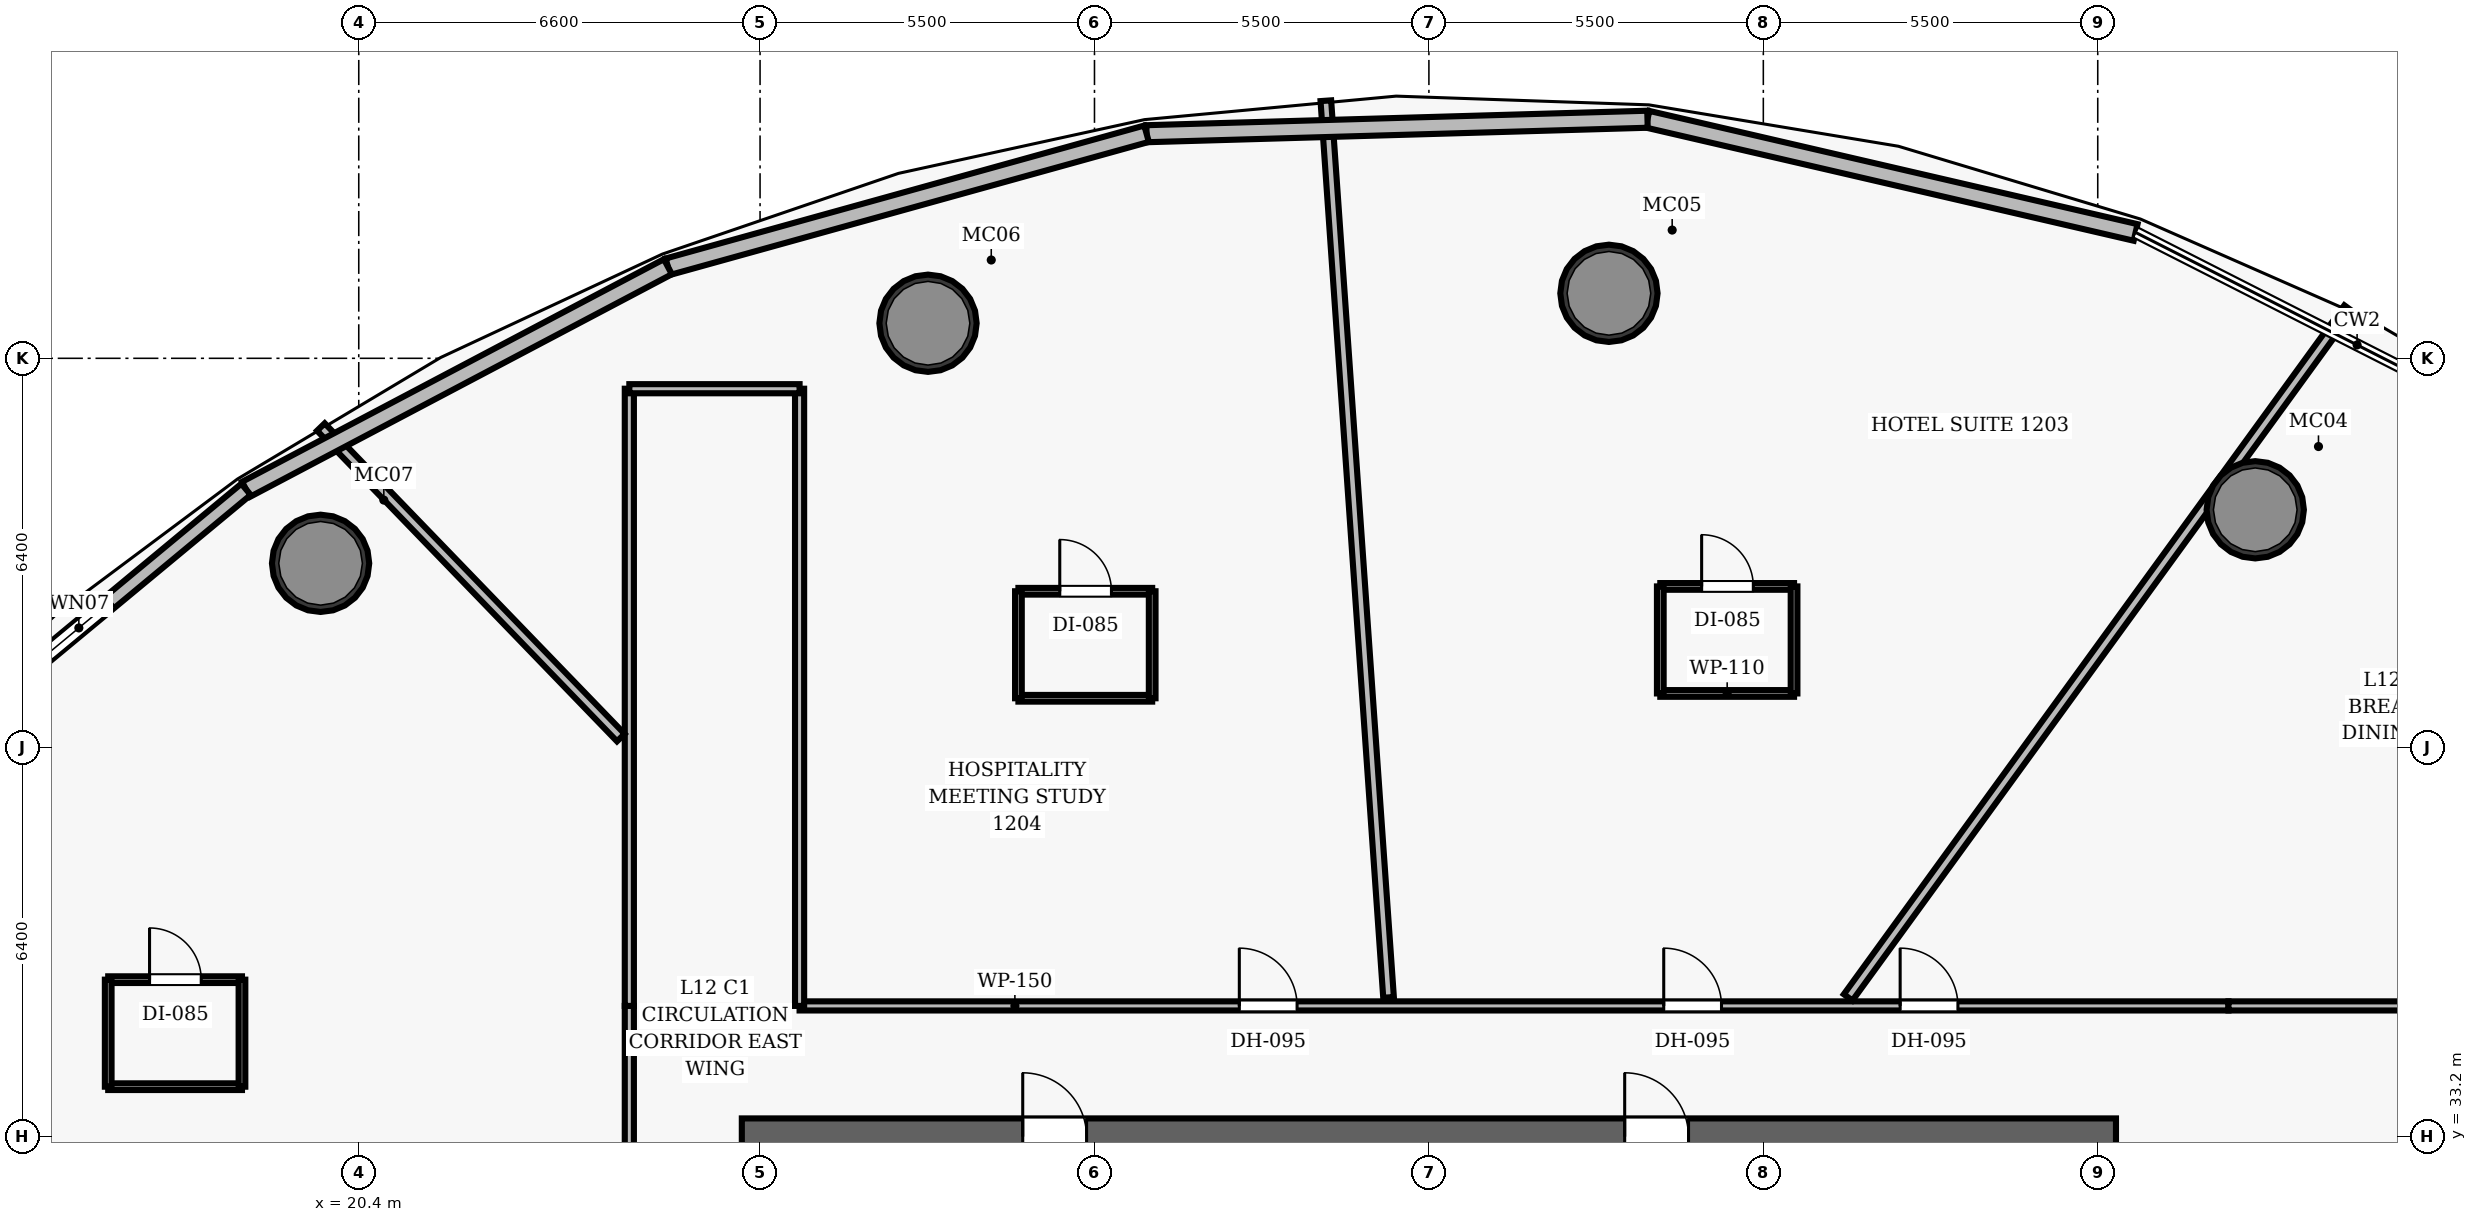
"""IFC4 building model, lengths in metres.
Left out: names, types, materials, properties, quantities, classifications, styles, units other than length and angle.
Written with IfcOpenShell. Run it as: python <this file> out.ifc"""

import sys

from ifc_helpers import new_model, si_unit, direction, frame, frame_2d, origin, origin_2d, place, context, subcontext, project, spatial, rectangle, hollow_circle, extrude, element, fill, save


model = new_model("IFC4")
c1 = context("Model", 3, precision=1e-05, world=origin(), true_north=direction((0.0, 1.0)))
c2 = subcontext(c1, "Body", "Model", "MODEL_VIEW")
j1 = project(units=[si_unit("LENGTHUNIT", "METRE"), si_unit("PLANEANGLEUNIT", "RADIAN")], contexts=[c1])
p1 = place(None, origin())
s1 = spatial("IfcSite", under=j1, at=p1, CompositionType="ELEMENT")
p2 = place(p1, origin())
s2 = spatial("IfcBuilding", under=s1, at=p2, CompositionType="ELEMENT")
p3 = place(p2, frame((0.0, 0.0, 58.9)))
s3 = spatial("IfcBuildingStorey", under=s2, at=p3, CompositionType="ELEMENT", Elevation=58.9)
p4 = place(p3, frame((26.7, 33.2, 0.0), z_axis=(0.0, 0.0, 1.0), x_axis=(1.0, 0.0, 0.0)))
e1 = element("IfcWall", 1, at=p4, inside=s3, PredefinedType="SHEAR", context=c2, shape_type="SweptSolid", body=[
    extrude(rectangle(XDim=22.6, YDim=0.6, at=frame_2d((11.3, 0.0))), origin(), (0.0, 0.0, 1.0), 3.5),
])
p5 = place(p4, frame((4.62, 0.0, 0.0)))
e2 = element("IfcOpeningElement", 2, at=p5, cuts=e1, PredefinedType="OPENING", context=c2, shape_type="SweptSolid", body=[
    extrude(rectangle(XDim=1.05, YDim=2.15, at=frame_2d((0.525, 1.075))), frame((0.0, 0.31, 0.0), z_axis=(0.0, -1.0, 0.0), x_axis=(1.0, 0.0, 0.0)), (0.0, 0.0, 1.0), 0.62),
])
p6 = place(p4, frame((14.52, 0.0, 0.0)))
e3 = element("IfcOpeningElement", 3, at=p6, cuts=e1, PredefinedType="OPENING", context=c2, shape_type="SweptSolid", body=[
    extrude(rectangle(XDim=1.05, YDim=2.15, at=frame_2d((0.525, 1.075))), frame((0.0, 0.31, 0.0), z_axis=(0.0, -1.0, 0.0), x_axis=(1.0, 0.0, 0.0)), (0.0, 0.0, 1.0), 0.62),
])
for number, where, z_axis, x_axis in (
    (4, (51.59, 43.509, 0.0), (0.0, 0.0, 1.0), (1.0, 0.0, 0.0)),
    (5, (40.961, 47.069, 0.0), (0.0, 0.0, 1.0), (1.0, 0.0, 0.0)),
    (6, (29.762, 46.577, 0.0), (0.0, 0.0, 1.0), (1.0, 0.0, 0.0)),
    (7, (19.772, 42.629, 0.0), (0.0, 0.0, 1.0), (1.0, 0.0, 0.0)),
):
    element("IfcColumn", number, at=place(p3, frame(where, z_axis=z_axis, x_axis=x_axis)), inside=s3, PredefinedType="COLUMN", context=c2, shape_type="SweptSolid", body=[
        extrude(hollow_circle(Radius=0.8, WallThickness=0.06, at=origin_2d()), origin(), (0.0, 0.0, 1.0), 3.5),
    ])
p7 = place(p3, frame((27.65, 35.35, 0.0), z_axis=(0.0, 0.0, 1.0), x_axis=(1.0, 0.0, 0.0)))
e8 = element("IfcWall", 8, at=p7, inside=s3, PredefinedType="PARTITIONING", context=c2, shape_type="SweptSolid", body=[
    extrude(rectangle(XDim=23.5, YDim=0.15, at=frame_2d((11.75, 0.0))), origin(), (0.0, 0.0, 1.0), 2.6),
])
p8 = place(p7, frame((18.1, 0.0, 0.0)))
e9 = element("IfcOpeningElement", 9, at=p8, cuts=e8, PredefinedType="OPENING", context=c2, shape_type="SweptSolid", body=[
    extrude(rectangle(XDim=0.95, YDim=2.15, at=frame_2d((0.475, 1.075))), frame((0.0, 0.085, 0.0), z_axis=(0.0, -1.0, 0.0), x_axis=(1.0, 0.0, 0.0)), (0.0, 0.0, 1.0), 0.17),
])
p9 = place(p7, frame((14.212, 0.0, 0.0)))
e10 = element("IfcOpeningElement", 10, at=p9, cuts=e8, PredefinedType="OPENING", context=c2, shape_type="SweptSolid", body=[
    extrude(rectangle(XDim=0.95, YDim=2.15, at=frame_2d((0.475, 1.075))), frame((0.0, 0.085, 0.0), z_axis=(0.0, -1.0, 0.0), x_axis=(1.0, 0.0, 0.0)), (0.0, 0.0, 1.0), 0.17),
])
p10 = place(p7, frame((7.232, 0.0, 0.0)))
e11 = element("IfcOpeningElement", 11, at=p10, cuts=e8, PredefinedType="OPENING", context=c2, shape_type="SweptSolid", body=[
    extrude(rectangle(XDim=0.95, YDim=2.15, at=frame_2d((0.475, 1.075))), frame((0.0, 0.085, 0.0), z_axis=(0.0, -1.0, 0.0), x_axis=(1.0, 0.0, 0.0)), (0.0, 0.0, 1.0), 0.17),
])
p11 = place(p3, frame((24.85, 19.45, 0.0), z_axis=(0.0, 0.0, 1.0), x_axis=(0.0, 1.0, 0.0)))
e12 = element("IfcWall", 12, at=p11, inside=s3, PredefinedType="PARTITIONING", context=c2, shape_type="SweptSolid", body=[
    extrude(rectangle(XDim=15.9, YDim=0.15, at=frame_2d((7.95, 0.0))), origin(), (0.0, 0.0, 1.0), 2.6),
])
p12 = place(p11, frame((9.236, 0.0, 0.0)))
e13 = element("IfcOpeningElement", 13, at=p12, cuts=e12, PredefinedType="OPENING", context=c2, shape_type="SweptSolid", body=[
    extrude(rectangle(XDim=0.95, YDim=2.15, at=frame_2d((0.475, 1.075))), frame((0.0, 0.085, 0.0), z_axis=(0.0, -1.0, 0.0), x_axis=(1.0, 0.0, 0.0)), (0.0, 0.0, 1.0), 0.17),
])
p13 = place(p11, frame((5.706, 0.0, 0.0)))
e14 = element("IfcOpeningElement", 14, at=p13, cuts=e12, PredefinedType="OPENING", context=c2, shape_type="SweptSolid", body=[
    extrude(rectangle(XDim=0.95, YDim=2.15, at=frame_2d((0.475, 1.075))), frame((0.0, 0.085, 0.0), z_axis=(0.0, -1.0, 0.0), x_axis=(1.0, 0.0, 0.0)), (0.0, 0.0, 1.0), 0.17),
])
p14 = place(p3, frame((51.15, 35.35, 0.0), z_axis=(0.0, 0.0, 1.0), x_axis=(1.0, 0.0, 0.0)))
e15 = element("IfcWall", 15, at=p14, inside=s3, PredefinedType="PARTITIONING", context=c2, shape_type="SweptSolid", body=[
    extrude(rectangle(XDim=14.35, YDim=0.15, at=frame_2d((7.175, 0.0))), origin(), (0.0, 0.0, 1.0), 2.6),
])
for number, where, z_axis, x_axis in (
    (16, (24.85, 35.35, 0.0), (0.0, 0.0, 1.0), (0.0, 1.0, 0.0)),
    (17, (27.65, 35.35, 0.0), (0.0, 0.0, 1.0), (0.0, 1.0, 0.0)),
):
    element("IfcWall", number, at=place(p3, frame(where, z_axis=z_axis, x_axis=x_axis)), inside=s3, PredefinedType="PARTITIONING", context=c2, shape_type="SweptSolid", body=[
        extrude(rectangle(XDim=10.15, YDim=0.15, at=frame_2d((5.075, 0.0))), origin(), (0.0, 0.0, 1.0), 2.6),
    ])
p15 = place(p3, frame((24.85, 45.5, 0.0), z_axis=(0.0, 0.0, 1.0), x_axis=(1.0, 0.0, 0.0)))
e18 = element("IfcWall", 18, at=p15, inside=s3, PredefinedType="PARTITIONING", context=c2, shape_type="SweptSolid", body=[
    extrude(rectangle(XDim=2.8, YDim=0.15, at=frame_2d((1.4, 0.0))), origin(), (0.0, 0.0, 1.0), 2.6),
])
p16 = place(p3, frame((44.895, 35.49, 0.0), z_axis=(0.0, 0.0, 1.0), x_axis=(0.587777731852, 0.809022458241, 0.0)))
e19 = element("IfcWall", 19, at=p16, inside=s3, PredefinedType="PARTITIONING", context=c2, shape_type="SweptSolid", body=[
    extrude(rectangle(XDim=14.004, YDim=0.175, at=frame_2d((7.002, 0.0))), origin(), (0.0, 0.0, 1.0), 2.6),
])
p17 = place(p3, frame((37.336, 35.49, 0.0), z_axis=(0.0, 0.0, 1.0), x_axis=(-0.06976338587, 0.997563566893, 0.0)))
e20 = element("IfcWall", 20, at=p17, inside=s3, PredefinedType="PARTITIONING", context=c2, shape_type="SweptSolid", body=[
    extrude(rectangle(XDim=14.782, YDim=0.175, at=frame_2d((7.391, 0.0))), origin(), (0.0, 0.0, 1.0), 2.6),
])
p18 = place(p3, frame((24.71, 39.762, 0.0), z_axis=(0.0, 0.0, 1.0), x_axis=(-0.694655869991, 0.719342215004, 0.0)))
e21 = element("IfcWall", 21, at=p18, inside=s3, PredefinedType="PARTITIONING", context=c2, shape_type="SweptSolid", body=[
    extrude(rectangle(XDim=7.101, YDim=0.175, at=frame_2d((3.55, 0.0))), origin(), (0.0, 0.0, 1.0), 2.6),
])
p19 = place(p3, frame((41.805, 40.489, 0.0), z_axis=(0.0, 0.0, 1.0), x_axis=(1.0, 0.0, 0.0)))
e22 = element("IfcWall", 22, at=p19, inside=s3, PredefinedType="PARTITIONING", context=c2, shape_type="SweptSolid", body=[
    extrude(rectangle(XDim=2.2, YDim=0.11, at=frame_2d((1.1, 0.0))), origin(), (0.0, 0.0, 1.0), 2.6),
])
p20 = place(p3, frame((41.805, 42.249, 0.0), z_axis=(0.0, 0.0, 1.0), x_axis=(1.0, 0.0, 0.0)))
e23 = element("IfcWall", 23, at=p20, inside=s3, PredefinedType="PARTITIONING", context=c2, shape_type="SweptSolid", body=[
    extrude(rectangle(XDim=2.2, YDim=0.11, at=frame_2d((1.1, 0.0))), origin(), (0.0, 0.0, 1.0), 2.6),
])
p21 = place(p20, frame((0.68, 0.0, 0.0)))
e24 = element("IfcOpeningElement", 24, at=p21, cuts=e23, PredefinedType="OPENING", context=c2, shape_type="SweptSolid", body=[
    extrude(rectangle(XDim=0.85, YDim=2.1, at=frame_2d((0.425, 1.05))), frame((0.0, 0.065, 0.0), z_axis=(0.0, -1.0, 0.0), x_axis=(1.0, 0.0, 0.0)), (0.0, 0.0, 1.0), 0.13),
])
for number, where, z_axis, x_axis in (
    (25, (41.805, 40.489, 0.0), (0.0, 0.0, 1.0), (0.0, 1.0, 0.0)),
    (26, (44.006, 40.489, 0.0), (0.0, 0.0, 1.0), (0.0, 1.0, 0.0)),
):
    element("IfcWall", number, at=place(p3, frame(where, z_axis=z_axis, x_axis=x_axis)), inside=s3, PredefinedType="PARTITIONING", context=c2, shape_type="SweptSolid", body=[
        extrude(rectangle(XDim=1.76, YDim=0.11, at=frame_2d((0.88, 0.0))), origin(), (0.0, 0.0, 1.0), 2.6),
    ])
p22 = place(p3, frame((31.249, 40.409, 0.0), z_axis=(0.0, 0.0, 1.0), x_axis=(1.0, 0.0, 0.0)))
e27 = element("IfcWall", 27, at=p22, inside=s3, PredefinedType="PARTITIONING", context=c2, shape_type="SweptSolid", body=[
    extrude(rectangle(XDim=2.2, YDim=0.11, at=frame_2d((1.1, 0.0))), origin(), (0.0, 0.0, 1.0), 2.6),
])
p23 = place(p3, frame((31.249, 42.169, 0.0), z_axis=(0.0, 0.0, 1.0), x_axis=(1.0, 0.0, 0.0)))
e28 = element("IfcWall", 28, at=p23, inside=s3, PredefinedType="PARTITIONING", context=c2, shape_type="SweptSolid", body=[
    extrude(rectangle(XDim=2.2, YDim=0.11, at=frame_2d((1.1, 0.0))), origin(), (0.0, 0.0, 1.0), 2.6),
])
p24 = place(p23, frame((0.68, 0.0, 0.0)))
e29 = element("IfcOpeningElement", 29, at=p24, cuts=e28, PredefinedType="OPENING", context=c2, shape_type="SweptSolid", body=[
    extrude(rectangle(XDim=0.85, YDim=2.1, at=frame_2d((0.425, 1.05))), frame((0.0, 0.065, 0.0), z_axis=(0.0, -1.0, 0.0), x_axis=(1.0, 0.0, 0.0)), (0.0, 0.0, 1.0), 0.13),
])
for number, where, z_axis, x_axis in (
    (30, (31.249, 40.409, 0.0), (0.0, 0.0, 1.0), (0.0, 1.0, 0.0)),
    (31, (33.449, 40.409, 0.0), (0.0, 0.0, 1.0), (0.0, 1.0, 0.0)),
):
    element("IfcWall", number, at=place(p3, frame(where, z_axis=z_axis, x_axis=x_axis)), inside=s3, PredefinedType="PARTITIONING", context=c2, shape_type="SweptSolid", body=[
        extrude(rectangle(XDim=1.76, YDim=0.11, at=frame_2d((0.88, 0.0))), origin(), (0.0, 0.0, 1.0), 2.6),
    ])
p25 = place(p3, frame((16.279, 34.022, 0.0), z_axis=(0.0, 0.0, 1.0), x_axis=(1.0, 0.0, 0.0)))
e32 = element("IfcWall", 32, at=p25, inside=s3, PredefinedType="PARTITIONING", context=c2, shape_type="SweptSolid", body=[
    extrude(rectangle(XDim=2.2, YDim=0.11, at=frame_2d((1.1, 0.0))), origin(), (0.0, 0.0, 1.0), 2.6),
])
p26 = place(p3, frame((16.279, 35.782, 0.0), z_axis=(0.0, 0.0, 1.0), x_axis=(1.0, 0.0, 0.0)))
e33 = element("IfcWall", 33, at=p26, inside=s3, PredefinedType="PARTITIONING", context=c2, shape_type="SweptSolid", body=[
    extrude(rectangle(XDim=2.2, YDim=0.11, at=frame_2d((1.1, 0.0))), origin(), (0.0, 0.0, 1.0), 2.6),
])
p27 = place(p26, frame((0.68, 0.0, 0.0)))
e34 = element("IfcOpeningElement", 34, at=p27, cuts=e33, PredefinedType="OPENING", context=c2, shape_type="SweptSolid", body=[
    extrude(rectangle(XDim=0.85, YDim=2.1, at=frame_2d((0.425, 1.05))), frame((0.0, 0.065, 0.0), z_axis=(0.0, -1.0, 0.0), x_axis=(1.0, 0.0, 0.0)), (0.0, 0.0, 1.0), 0.13),
])
for number, where, z_axis, x_axis in (
    (35, (16.279, 34.022, 0.0), (0.0, 0.0, 1.0), (0.0, 1.0, 0.0)),
    (36, (18.479, 34.022, 0.0), (0.0, 0.0, 1.0), (0.0, 1.0, 0.0)),
):
    element("IfcWall", number, at=place(p3, frame(where, z_axis=z_axis, x_axis=x_axis)), inside=s3, PredefinedType="PARTITIONING", context=c2, shape_type="SweptSolid", body=[
        extrude(rectangle(XDim=1.76, YDim=0.11, at=frame_2d((0.88, 0.0))), origin(), (0.0, 0.0, 1.0), 2.6),
    ])
p28 = place(p3, frame((41.595, 49.932, 0.0), z_axis=(0.0, 0.0, 1.0), x_axis=(0.974146467813, -0.22591737261, 0.0)))
e37 = element("IfcWall", 37, at=p28, inside=s3, PredefinedType="SOLIDWALL", context=c2, shape_type="SweptSolid", body=[
    extrude(rectangle(XDim=8.241, YDim=0.28, at=frame_2d((4.121, 0.0))), origin(), (0.0, 0.0, 1.0), 3.25),
])
p29 = place(p3, frame((33.357, 49.693, 0.0), z_axis=(0.0, 0.0, 1.0), x_axis=(0.999581948435, 0.028912425738, 0.0)))
e38 = element("IfcWall", 38, at=p29, inside=s3, PredefinedType="SOLIDWALL", context=c2, shape_type="SweptSolid", body=[
    extrude(rectangle(XDim=8.241, YDim=0.28, at=frame_2d((4.121, 0.0))), origin(), (0.0, 0.0, 1.0), 3.25),
])
p30 = place(p3, frame((25.484, 47.506, 0.0), z_axis=(0.0, 0.0, 1.0), x_axis=(0.963511916256, 0.267665438995, 0.0)))
e39 = element("IfcWall", 39, at=p30, inside=s3, PredefinedType="SOLIDWALL", context=c2, shape_type="SweptSolid", body=[
    extrude(rectangle(XDim=8.171, YDim=0.28, at=frame_2d((4.085, 0.0))), origin(), (0.0, 0.0, 1.0), 3.25),
])
p31 = place(p3, frame((18.546, 43.845, 0.0), z_axis=(0.0, 0.0, 1.0), x_axis=(0.884435063854, 0.466663280991, 0.0)))
e40 = element("IfcWall", 40, at=p31, inside=s3, PredefinedType="SOLIDWALL", context=c2, shape_type="SweptSolid", body=[
    extrude(rectangle(XDim=7.845, YDim=0.28, at=frame_2d((3.922, 0.0))), origin(), (0.0, 0.0, 1.0), 3.25),
])
p32 = place(p3, frame((13.047, 39.286, 0.0), z_axis=(0.0, 0.0, 1.0), x_axis=(0.769818580763, 0.638262761496, 0.0)))
e41 = element("IfcWall", 41, at=p32, inside=s3, PredefinedType="SOLIDWALL", context=c2, shape_type="SweptSolid", body=[
    extrude(rectangle(XDim=7.143, YDim=0.24, at=frame_2d((3.572, 0.0))), origin(), (0.0, 0.0, 1.0), 3.25),
])
p33 = place(p32, frame((2.896, 0.0, 0.85)))
e42 = element("IfcOpeningElement", 42, at=p33, cuts=e41, PredefinedType="OPENING", context=c2, shape_type="SweptSolid", body=[
    extrude(rectangle(XDim=1.35, YDim=1.65, at=frame_2d((0.675, 0.825))), frame((0.0, 0.13, 0.0), z_axis=(0.0, -1.0, 0.0), x_axis=(1.0, 0.0, 0.0)), (0.0, 0.0, 1.0), 0.26),
])
p34 = place(p5, origin())
e43 = element("IfcDoor", 43, at=p34, inside=s3, OperationType="SINGLE_SWING_LEFT", PredefinedType="DOOR", context=c2, shape_type="SweptSolid", body=[
    extrude(rectangle(XDim=1.05, YDim=2.15, at=frame_2d((0.525, 1.075))), frame((0.0, 0.025, 0.0), z_axis=(0.0, -1.0, 0.0), x_axis=(1.0, 0.0, 0.0)), (0.0, 0.0, 1.0), 0.05),
])
fill(e2, e43)
p35 = place(p6, origin())
e44 = element("IfcDoor", 44, at=p35, inside=s3, OperationType="SINGLE_SWING_LEFT", PredefinedType="DOOR", context=c2, shape_type="SweptSolid", body=[
    extrude(rectangle(XDim=1.05, YDim=2.15, at=frame_2d((0.525, 1.075))), frame((0.0, 0.025, 0.0), z_axis=(0.0, -1.0, 0.0), x_axis=(1.0, 0.0, 0.0)), (0.0, 0.0, 1.0), 0.05),
])
fill(e3, e44)
p36 = place(p8, origin())
e45 = element("IfcDoor", 45, at=p36, inside=s3, OperationType="SINGLE_SWING_LEFT", PredefinedType="DOOR", context=c2, shape_type="SweptSolid", body=[
    extrude(rectangle(XDim=0.95, YDim=2.15, at=frame_2d((0.475, 1.075))), frame((0.0, 0.025, 0.0), z_axis=(0.0, -1.0, 0.0), x_axis=(1.0, 0.0, 0.0)), (0.0, 0.0, 1.0), 0.05),
])
fill(e9, e45)
p37 = place(p9, origin())
e46 = element("IfcDoor", 46, at=p37, inside=s3, OperationType="SINGLE_SWING_LEFT", PredefinedType="DOOR", context=c2, shape_type="SweptSolid", body=[
    extrude(rectangle(XDim=0.95, YDim=2.15, at=frame_2d((0.475, 1.075))), frame((0.0, 0.025, 0.0), z_axis=(0.0, -1.0, 0.0), x_axis=(1.0, 0.0, 0.0)), (0.0, 0.0, 1.0), 0.05),
])
fill(e10, e46)
p38 = place(p21, origin())
e47 = element("IfcDoor", 47, at=p38, inside=s3, OperationType="SINGLE_SWING_LEFT", PredefinedType="DOOR", context=c2, shape_type="SweptSolid", body=[
    extrude(rectangle(XDim=0.85, YDim=2.1, at=frame_2d((0.425, 1.05))), frame((0.0, 0.025, 0.0), z_axis=(0.0, -1.0, 0.0), x_axis=(1.0, 0.0, 0.0)), (0.0, 0.0, 1.0), 0.05),
])
fill(e24, e47)
p39 = place(p10, origin())
e48 = element("IfcDoor", 48, at=p39, inside=s3, OperationType="SINGLE_SWING_LEFT", PredefinedType="DOOR", context=c2, shape_type="SweptSolid", body=[
    extrude(rectangle(XDim=0.95, YDim=2.15, at=frame_2d((0.475, 1.075))), frame((0.0, 0.025, 0.0), z_axis=(0.0, -1.0, 0.0), x_axis=(1.0, 0.0, 0.0)), (0.0, 0.0, 1.0), 0.05),
])
fill(e11, e48)
p40 = place(p24, origin())
e49 = element("IfcDoor", 49, at=p40, inside=s3, OperationType="SINGLE_SWING_LEFT", PredefinedType="DOOR", context=c2, shape_type="SweptSolid", body=[
    extrude(rectangle(XDim=0.85, YDim=2.1, at=frame_2d((0.425, 1.05))), frame((0.0, 0.025, 0.0), z_axis=(0.0, -1.0, 0.0), x_axis=(1.0, 0.0, 0.0)), (0.0, 0.0, 1.0), 0.05),
])
fill(e29, e49)
p41 = place(p27, origin())
e50 = element("IfcDoor", 50, at=p41, inside=s3, OperationType="SINGLE_SWING_LEFT", PredefinedType="DOOR", context=c2, shape_type="SweptSolid", body=[
    extrude(rectangle(XDim=0.85, YDim=2.1, at=frame_2d((0.425, 1.05))), frame((0.0, 0.025, 0.0), z_axis=(0.0, -1.0, 0.0), x_axis=(1.0, 0.0, 0.0)), (0.0, 0.0, 1.0), 0.05),
])
fill(e34, e50)
p42 = place(p33, origin())
e51 = element("IfcWindow", 51, at=p42, inside=s3, PartitioningType="SINGLE_PANEL", PredefinedType="WINDOW", context=c2, shape_type="SweptSolid", body=[
    extrude(rectangle(XDim=1.35, YDim=1.65, at=frame_2d((0.675, 0.825))), frame((0.0, 0.03, 0.0), z_axis=(0.0, -1.0, 0.0), x_axis=(1.0, 0.0, 0.0)), (0.0, 0.0, 1.0), 0.06),
])
fill(e42, e51)
save(model, sys.argv[1])
